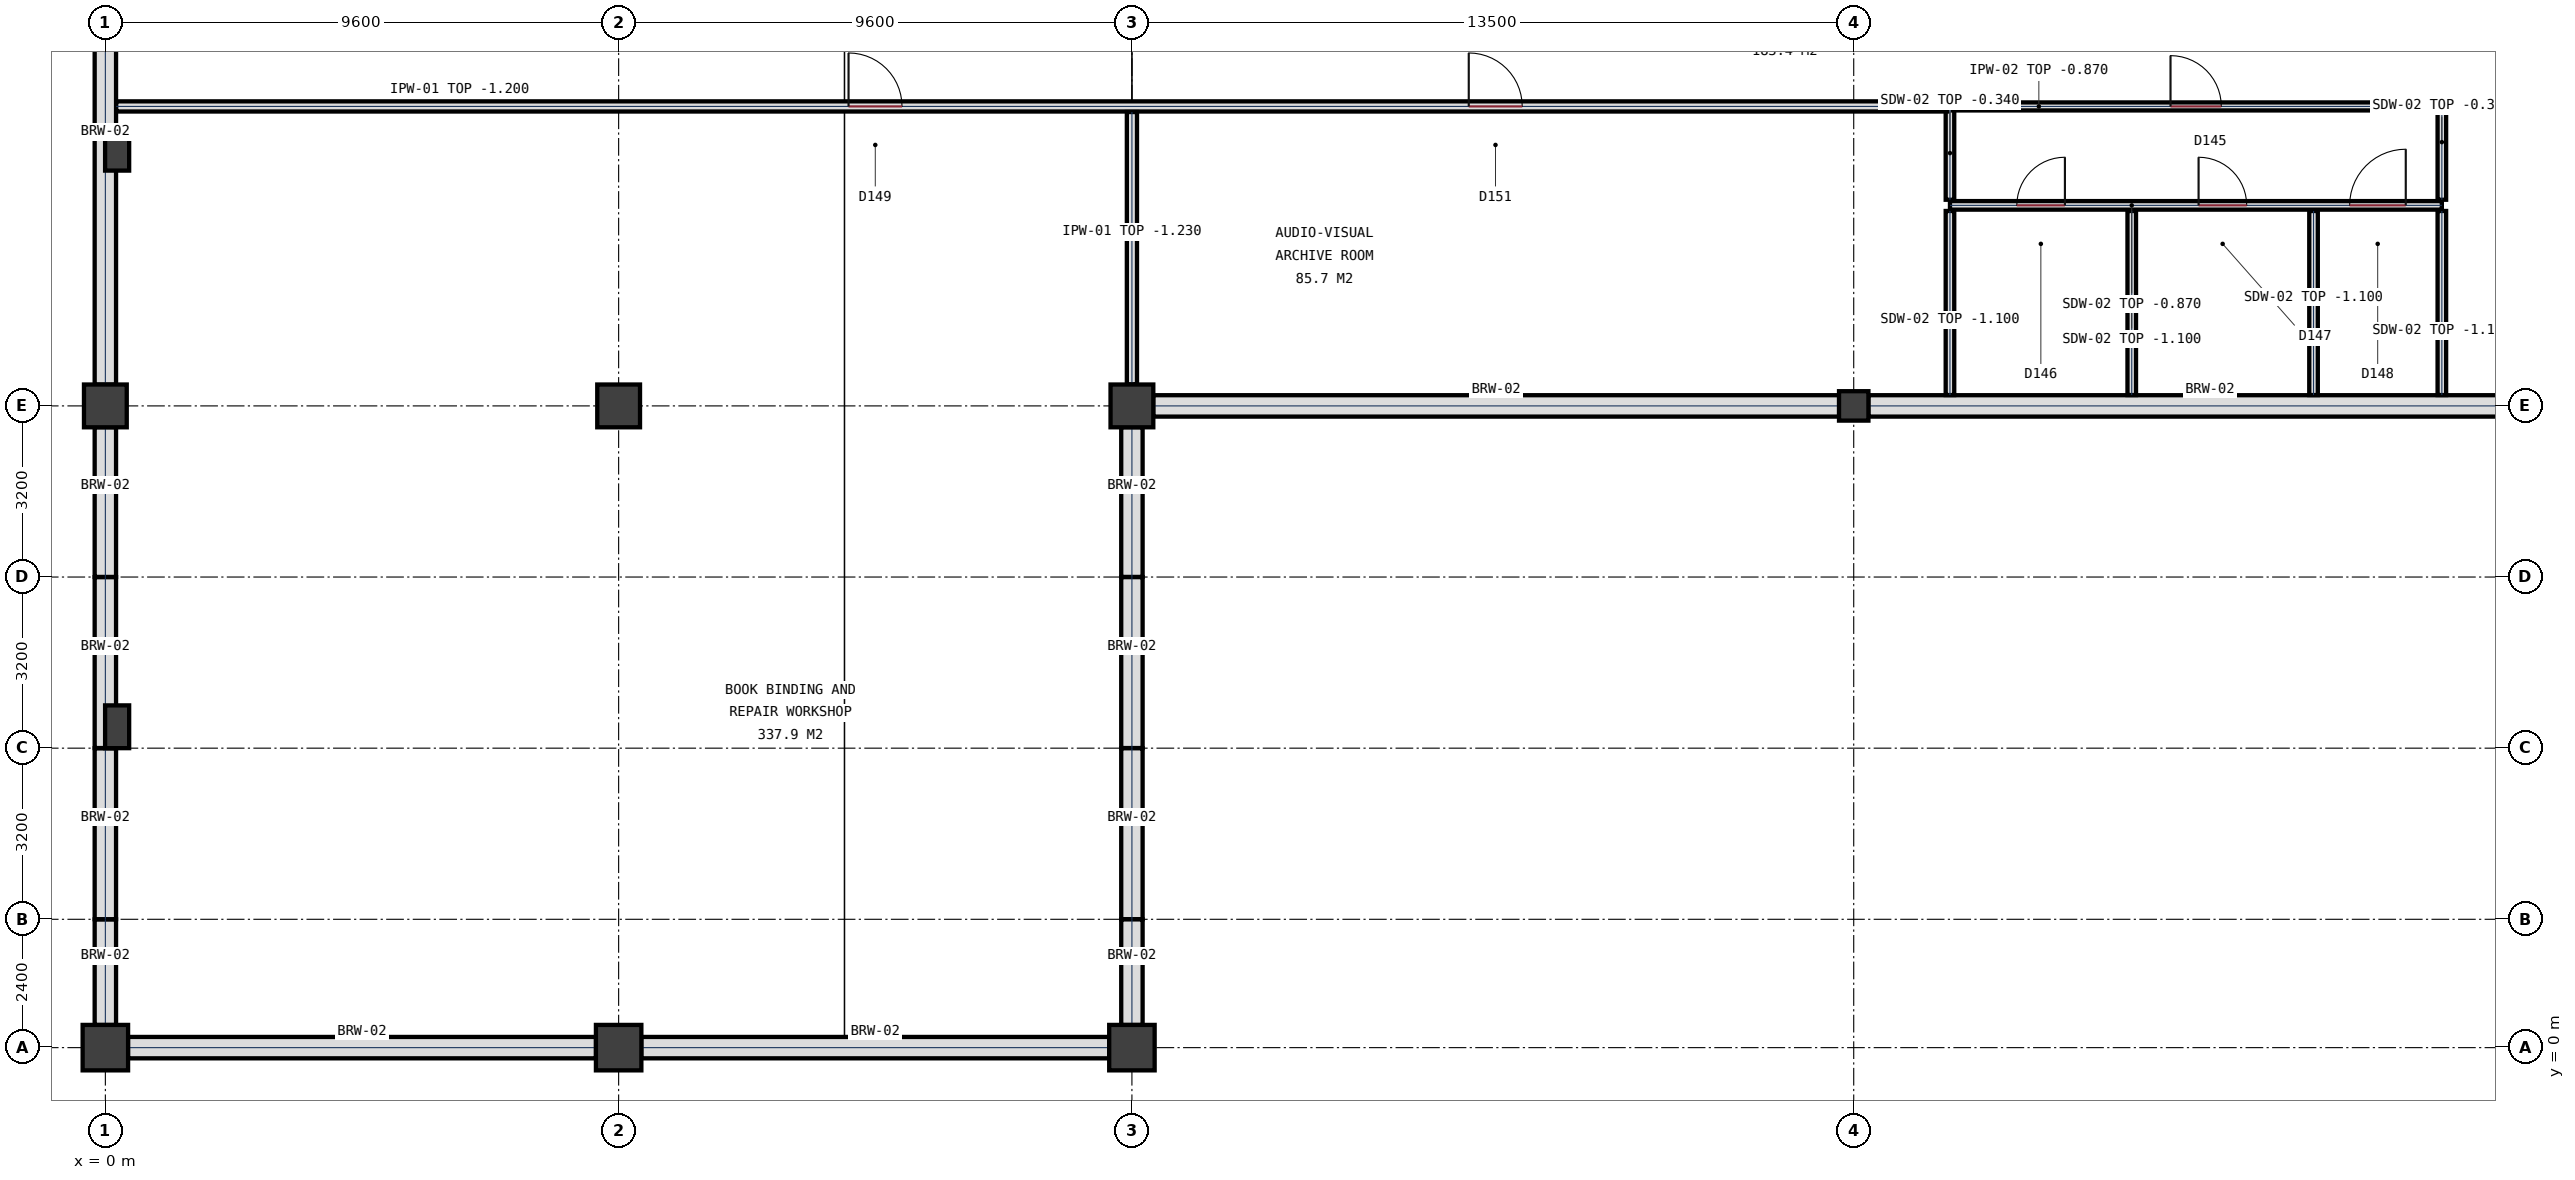
"""IFC4 building model, lengths in metres.
Left out: names, types, materials, properties, quantities, classifications, styles, units other than length and angle.
Written with IfcOpenShell. Run it as: python <this file> out.ifc"""

import sys

from ifc_helpers import new_model, si_unit, direction, frame, frame_2d, origin, origin_with_axes, origin_2d, place, context, subcontext, project, spatial, rectangle, extrude, element, fill, save


model = new_model("IFC4")
c1 = context("Model", 3, precision=1e-05, world=origin(), true_north=direction((0.0, 1.0)))
c2 = subcontext(c1, "Body", "Model", "MODEL_VIEW")
j1 = project(units=[si_unit("LENGTHUNIT", "METRE"), si_unit("PLANEANGLEUNIT", "RADIAN")], contexts=[c1])
p1 = place(None, origin())
s1 = spatial("IfcSite", under=j1, at=p1, CompositionType="ELEMENT")
p2 = place(p1, origin())
s2 = spatial("IfcBuilding", under=s1, at=p2, CompositionType="ELEMENT")
p3 = place(p2, frame((0.0, 0.0, -4.2)))
s3 = spatial("IfcBuildingStorey", under=s2, at=p3, CompositionType="ELEMENT", Elevation=-4.2)
p4 = place(p3, origin_with_axes())
e1 = element("IfcColumn", 1, at=p4, inside=s3, PredefinedType="COLUMN", context=c2, shape_type="SweptSolid", body=[
    extrude(rectangle(XDim=0.85, YDim=0.85, at=origin_2d()), origin(), (0.0, 0.0, 1.0), 4.2),
])
p5 = place(p3, frame((0.0, 12.0, 0.0), z_axis=(0.0, 0.0, 1.0), x_axis=(1.0, 0.0, 0.0)))
e2 = element("IfcColumn", 2, at=p5, inside=s3, PredefinedType="COLUMN", context=c2, shape_type="SweptSolid", body=[
    extrude(rectangle(XDim=0.8, YDim=0.8, at=origin_2d()), origin(), (0.0, 0.0, 1.0), 4.2),
])
p6 = place(p3, frame((9.6, 0.0, 0.0), z_axis=(0.0, 0.0, 1.0), x_axis=(1.0, 0.0, 0.0)))
e3 = element("IfcColumn", 3, at=p6, inside=s3, PredefinedType="COLUMN", context=c2, shape_type="SweptSolid", body=[
    extrude(rectangle(XDim=0.85, YDim=0.85, at=origin_2d()), origin(), (0.0, 0.0, 1.0), 4.2),
])
p7 = place(p3, frame((9.6, 12.0, 0.0), z_axis=(0.0, 0.0, 1.0), x_axis=(1.0, 0.0, 0.0)))
e4 = element("IfcColumn", 4, at=p7, inside=s3, PredefinedType="COLUMN", context=c2, shape_type="SweptSolid", body=[
    extrude(rectangle(XDim=0.8, YDim=0.8, at=origin_2d()), origin(), (0.0, 0.0, 1.0), 4.2),
])
p8 = place(p3, frame((19.2, 0.0, 0.0), z_axis=(0.0, 0.0, 1.0), x_axis=(1.0, 0.0, 0.0)))
e5 = element("IfcColumn", 5, at=p8, inside=s3, PredefinedType="COLUMN", context=c2, shape_type="SweptSolid", body=[
    extrude(rectangle(XDim=0.85, YDim=0.85, at=origin_2d()), origin(), (0.0, 0.0, 1.0), 4.2),
])
p9 = place(p3, frame((19.2, 12.0, 0.0), z_axis=(0.0, 0.0, 1.0), x_axis=(1.0, 0.0, 0.0)))
e6 = element("IfcColumn", 6, at=p9, inside=s3, PredefinedType="COLUMN", context=c2, shape_type="SweptSolid", body=[
    extrude(rectangle(XDim=0.8, YDim=0.8, at=origin_2d()), origin(), (0.0, 0.0, 1.0), 4.2),
])
p10 = place(p3, frame((32.7, 12.0, 0.0), z_axis=(0.0, 0.0, 1.0), x_axis=(1.0, 0.0, 0.0)))
e7 = element("IfcColumn", 7, at=p10, inside=s3, PredefinedType="COLUMN", context=c2, shape_type="SweptSolid", body=[
    extrude(rectangle(XDim=0.55, YDim=0.55, at=origin_2d()), origin(), (0.0, 0.0, 1.0), 4.2),
])
for number, where, z_axis, x_axis in (
    (8, (0.22, 6.0, 0.0), (0.0, 0.0, 1.0), (1.0, 0.0, 0.0)),
    (9, (0.22, 16.8, 0.0), (0.0, 0.0, 1.0), (1.0, 0.0, 0.0)),
):
    element("IfcColumn", number, at=place(p3, frame(where, z_axis=z_axis, x_axis=x_axis)), inside=s3, PredefinedType="PILASTER", context=c2, shape_type="SweptSolid", body=[
        extrude(rectangle(XDim=0.45, YDim=0.8, at=origin_2d()), origin(), (0.0, 0.0, 1.0), 4.2),
    ])
p11 = place(p3, frame((18.777, 0.0, 0.0), z_axis=(0.0, 0.0, 1.0), x_axis=(-1.0, 0.0, 0.0)))
e10 = element("IfcWall", 10, at=p11, inside=s3, PredefinedType="USERDEFINED", context=c2, shape_type="SweptSolid", body=[
    extrude(rectangle(XDim=8.754, YDim=0.4, at=frame_2d((4.377, 0.0))), origin(), (0.0, 0.0, 1.0), 3.88),
])
p12 = place(p3, frame((9.177, 0.0, 0.0), z_axis=(0.0, 0.0, 1.0), x_axis=(-1.0, 0.0, 0.0)))
e11 = element("IfcWall", 11, at=p12, inside=s3, PredefinedType="USERDEFINED", context=c2, shape_type="SweptSolid", body=[
    extrude(rectangle(XDim=8.754, YDim=0.4, at=frame_2d((4.377, 0.0))), origin(), (0.0, 0.0, 1.0), 3.88),
])
p13 = place(p3, frame((0.0, 0.423, 0.0), z_axis=(0.0, 0.0, 1.0), x_axis=(0.0, 1.0, 0.0)))
e12 = element("IfcWall", 12, at=p13, inside=s3, PredefinedType="USERDEFINED", context=c2, shape_type="SweptSolid", body=[
    extrude(rectangle(XDim=1.975, YDim=0.4, at=frame_2d((0.987, 0.0))), origin(), (0.0, 0.0, 1.0), 3.88),
])
p14 = place(p3, frame((0.0, 2.402, 0.0), z_axis=(0.0, 0.0, 1.0), x_axis=(0.0, 1.0, 0.0)))
e13 = element("IfcWall", 13, at=p14, inside=s3, PredefinedType="USERDEFINED", context=c2, shape_type="SweptSolid", body=[
    extrude(rectangle(XDim=3.196, YDim=0.4, at=frame_2d((1.598, 0.0))), origin(), (0.0, 0.0, 1.0), 3.88),
])
p15 = place(p3, frame((0.0, 5.602, 0.0), z_axis=(0.0, 0.0, 1.0), x_axis=(0.0, 1.0, 0.0)))
e14 = element("IfcWall", 14, at=p15, inside=s3, PredefinedType="USERDEFINED", context=c2, shape_type="SweptSolid", body=[
    extrude(rectangle(XDim=3.196, YDim=0.4, at=frame_2d((1.598, 0.0))), origin(), (0.0, 0.0, 1.0), 3.88),
])
p16 = place(p3, frame((0.0, 8.802, 0.0), z_axis=(0.0, 0.0, 1.0), x_axis=(0.0, 1.0, 0.0)))
e15 = element("IfcWall", 15, at=p16, inside=s3, PredefinedType="USERDEFINED", context=c2, shape_type="SweptSolid", body=[
    extrude(rectangle(XDim=2.8, YDim=0.4, at=frame_2d((1.4, 0.0))), origin(), (0.0, 0.0, 1.0), 3.88),
])
p17 = place(p3, frame((0.0, 12.398, 0.0), z_axis=(0.0, 0.0, 1.0), x_axis=(0.0, 1.0, 0.0)))
e16 = element("IfcWall", 16, at=p17, inside=s3, PredefinedType="USERDEFINED", context=c2, shape_type="SweptSolid", body=[
    extrude(rectangle(XDim=8.829, YDim=0.4, at=frame_2d((4.415, 0.0))), origin(), (0.0, 0.0, 1.0), 3.88),
])
p18 = place(p3, frame((45.752, 12.0, 0.0), z_axis=(0.0, 0.0, 1.0), x_axis=(-1.0, 0.0, 0.0)))
e17 = element("IfcWall", 17, at=p18, inside=s3, PredefinedType="USERDEFINED", context=c2, shape_type="SweptSolid", body=[
    extrude(rectangle(XDim=12.779, YDim=0.4, at=frame_2d((6.39, 0.0))), origin(), (0.0, 0.0, 1.0), 3.86),
])
p19 = place(p3, frame((32.427, 12.0, 0.0), z_axis=(0.0, 0.0, 1.0), x_axis=(-1.0, 0.0, 0.0)))
e18 = element("IfcWall", 18, at=p19, inside=s3, PredefinedType="USERDEFINED", context=c2, shape_type="SweptSolid", body=[
    extrude(rectangle(XDim=12.829, YDim=0.4, at=frame_2d((6.415, 0.0))), origin(), (0.0, 0.0, 1.0), 3.86),
])
p20 = place(p3, frame((19.2, 11.602, 0.0), z_axis=(0.0, 0.0, 1.0), x_axis=(0.0, -1.0, 0.0)))
e19 = element("IfcWall", 19, at=p20, inside=s3, PredefinedType="USERDEFINED", context=c2, shape_type="SweptSolid", body=[
    extrude(rectangle(XDim=2.8, YDim=0.4, at=frame_2d((1.4, 0.0))), origin(), (0.0, 0.0, 1.0), 3.88),
])
p21 = place(p3, frame((19.2, 8.798, 0.0), z_axis=(0.0, 0.0, 1.0), x_axis=(0.0, -1.0, 0.0)))
e20 = element("IfcWall", 20, at=p21, inside=s3, PredefinedType="USERDEFINED", context=c2, shape_type="SweptSolid", body=[
    extrude(rectangle(XDim=3.196, YDim=0.4, at=frame_2d((1.598, 0.0))), origin(), (0.0, 0.0, 1.0), 3.88),
])
p22 = place(p3, frame((19.2, 5.598, 0.0), z_axis=(0.0, 0.0, 1.0), x_axis=(0.0, -1.0, 0.0)))
e21 = element("IfcWall", 21, at=p22, inside=s3, PredefinedType="USERDEFINED", context=c2, shape_type="SweptSolid", body=[
    extrude(rectangle(XDim=3.196, YDim=0.4, at=frame_2d((1.598, 0.0))), origin(), (0.0, 0.0, 1.0), 3.88),
])
p23 = place(p3, frame((19.2, 2.398, 0.0), z_axis=(0.0, 0.0, 1.0), x_axis=(0.0, -1.0, 0.0)))
e22 = element("IfcWall", 22, at=p23, inside=s3, PredefinedType="USERDEFINED", context=c2, shape_type="SweptSolid", body=[
    extrude(rectangle(XDim=1.975, YDim=0.4, at=frame_2d((0.987, 0.0))), origin(), (0.0, 0.0, 1.0), 3.88),
])
p24 = place(p3, frame((34.5, 15.75, 0.0), z_axis=(0.0, 0.0, 1.0), x_axis=(1.0, 0.0, 0.0)))
e23 = element("IfcWall", 23, at=p24, inside=s3, PredefinedType="PLUMBINGWALL", context=c2, shape_type="SweptSolid", body=[
    extrude(rectangle(XDim=9.2, YDim=0.16, at=frame_2d((4.6, 0.0))), origin(), (0.0, 0.0, 1.0), 3.33),
])
p25 = place(p24, frame((1.25, 0.0, 0.0)))
e24 = element("IfcOpeningElement", 24, at=p25, cuts=e23, PredefinedType="OPENING", context=c2, shape_type="SweptSolid", body=[
    extrude(rectangle(XDim=0.9, YDim=2.1, at=frame_2d((0.45, 1.05))), frame((0.0, 0.09, 0.0), z_axis=(0.0, -1.0, 0.0), x_axis=(1.0, 0.0, 0.0)), (0.0, 0.0, 1.0), 0.18),
])
p26 = place(p24, frame((4.65, 0.0, 0.0)))
e25 = element("IfcOpeningElement", 25, at=p26, cuts=e23, PredefinedType="OPENING", context=c2, shape_type="SweptSolid", body=[
    extrude(rectangle(XDim=0.9, YDim=2.1, at=frame_2d((0.45, 1.05))), frame((0.0, 0.09, 0.0), z_axis=(0.0, -1.0, 0.0), x_axis=(1.0, 0.0, 0.0)), (0.0, 0.0, 1.0), 0.18),
])
p27 = place(p24, frame((7.475, 0.0, 0.0)))
e26 = element("IfcOpeningElement", 26, at=p27, cuts=e23, PredefinedType="OPENING", context=c2, shape_type="SweptSolid", body=[
    extrude(rectangle(XDim=1.05, YDim=2.15, at=frame_2d((0.525, 1.075))), frame((0.0, 0.09, 0.0), z_axis=(0.0, -1.0, 0.0), x_axis=(1.0, 0.0, 0.0)), (0.0, 0.0, 1.0), 0.18),
])
p28 = place(p3, frame((34.5, 12.203, 0.0), z_axis=(0.0, 0.0, 1.0), x_axis=(0.0, 1.0, 0.0)))
e27 = element("IfcWall", 27, at=p28, inside=s3, PredefinedType="PLUMBINGWALL", context=c2, shape_type="SweptSolid", body=[
    extrude(rectangle(XDim=3.442, YDim=0.16, at=frame_2d((1.721, 0.0))), origin(), (0.0, 0.0, 1.0), 3.1),
])
p29 = place(p3, frame((34.5, 15.855, 0.0), z_axis=(0.0, 0.0, 1.0), x_axis=(0.0, 1.0, 0.0)))
e28 = element("IfcWall", 28, at=p29, inside=s3, PredefinedType="PLUMBINGWALL", context=c2, shape_type="SweptSolid", body=[
    extrude(rectangle(XDim=1.745, YDim=0.16, at=frame_2d((0.873, 0.0))), origin(), (0.0, 0.0, 1.0), 3.86),
])
for number, where, z_axis, x_axis in (
    (29, (37.9, 12.203, 0.0), (0.0, 0.0, 1.0), (0.0, 1.0, 0.0)),
    (30, (41.3, 12.203, 0.0), (0.0, 0.0, 1.0), (0.0, 1.0, 0.0)),
    (31, (43.7, 12.203, 0.0), (0.0, 0.0, 1.0), (0.0, 1.0, 0.0)),
):
    element("IfcWall", number, at=place(p3, frame(where, z_axis=z_axis, x_axis=x_axis)), inside=s3, PredefinedType="PLUMBINGWALL", context=c2, shape_type="SweptSolid", body=[
        extrude(rectangle(XDim=3.442, YDim=0.16, at=frame_2d((1.721, 0.0))), origin(), (0.0, 0.0, 1.0), 3.1),
    ])
p30 = place(p3, frame((43.7, 15.855, 0.0), z_axis=(0.0, 0.0, 1.0), x_axis=(0.0, 1.0, 0.0)))
e32 = element("IfcWall", 32, at=p30, inside=s3, PredefinedType="PLUMBINGWALL", context=c2, shape_type="SweptSolid", body=[
    extrude(rectangle(XDim=1.745, YDim=0.16, at=frame_2d((0.873, 0.0))), origin(), (0.0, 0.0, 1.0), 3.86),
])
p31 = place(p3, frame((0.203, 17.6, 0.0), z_axis=(0.0, 0.0, 1.0), x_axis=(1.0, 0.0, 0.0)))
e33 = element("IfcWall", 33, at=p31, inside=s3, PredefinedType="PARTITIONING", context=c2, shape_type="SweptSolid", body=[
    extrude(rectangle(XDim=34.247, YDim=0.19, at=frame_2d((17.124, 0.0))), origin(), (0.0, 0.0, 1.0), 3.0),
])
p32 = place(p31, frame((13.697, 0.0, 0.0)))
e34 = element("IfcOpeningElement", 34, at=p32, cuts=e33, PredefinedType="OPENING", context=c2, shape_type="SweptSolid", body=[
    extrude(rectangle(XDim=1.0, YDim=2.2, at=frame_2d((0.5, 1.1))), frame((0.0, 0.105, 0.0), z_axis=(0.0, -1.0, 0.0), x_axis=(1.0, 0.0, 0.0)), (0.0, 0.0, 1.0), 0.21),
])
p33 = place(p31, frame((25.297, 0.0, 0.0)))
e35 = element("IfcOpeningElement", 35, at=p33, cuts=e33, PredefinedType="OPENING", context=c2, shape_type="SweptSolid", body=[
    extrude(rectangle(XDim=1.0, YDim=2.2, at=frame_2d((0.5, 1.1))), frame((0.0, 0.105, 0.0), z_axis=(0.0, -1.0, 0.0), x_axis=(1.0, 0.0, 0.0)), (0.0, 0.0, 1.0), 0.21),
])
p34 = place(p3, frame((34.55, 17.6, 0.0), z_axis=(0.0, 0.0, 1.0), x_axis=(1.0, 0.0, 0.0)))
e36 = element("IfcWall", 36, at=p34, inside=s3, PredefinedType="PARTITIONING", context=c2, shape_type="SweptSolid", body=[
    extrude(rectangle(XDim=9.1, YDim=0.15, at=frame_2d((4.55, 0.0))), origin(), (0.0, 0.0, 1.0), 3.33),
])
p35 = place(p34, frame((4.075, 0.0, 0.0)))
e37 = element("IfcOpeningElement", 37, at=p35, cuts=e36, PredefinedType="OPENING", context=c2, shape_type="SweptSolid", body=[
    extrude(rectangle(XDim=0.95, YDim=2.15, at=frame_2d((0.475, 1.075))), frame((0.0, 0.085, 0.0), z_axis=(0.0, -1.0, 0.0), x_axis=(1.0, 0.0, 0.0)), (0.0, 0.0, 1.0), 0.17),
])
p36 = place(p3, frame((43.75, 17.6, 0.0), z_axis=(0.0, 0.0, 1.0), x_axis=(1.0, 0.0, 0.0)))
e38 = element("IfcWall", 38, at=p36, inside=s3, PredefinedType="PARTITIONING", context=c2, shape_type="SweptSolid", body=[
    extrude(rectangle(XDim=16.7, YDim=0.13, at=frame_2d((8.35, 0.0))), origin(), (0.0, 0.0, 1.0), 2.95),
])
p37 = place(p36, frame((8.675, 0.0, 0.0)))
e39 = element("IfcOpeningElement", 39, at=p37, cuts=e38, PredefinedType="OPENING", context=c2, shape_type="SweptSolid", body=[
    extrude(rectangle(XDim=0.95, YDim=2.15, at=frame_2d((0.475, 1.075))), frame((0.0, 0.075, 0.0), z_axis=(0.0, -1.0, 0.0), x_axis=(1.0, 0.0, 0.0)), (0.0, 0.0, 1.0), 0.15),
])
p38 = place(p3, frame((19.2, 12.403, 0.0), z_axis=(0.0, 0.0, 1.0), x_axis=(0.0, 1.0, 0.0)))
e40 = element("IfcWall", 40, at=p38, inside=s3, PredefinedType="PARTITIONING", context=c2, shape_type="SweptSolid", body=[
    extrude(rectangle(XDim=5.092, YDim=0.19, at=frame_2d((2.546, 0.0))), origin(), (0.0, 0.0, 1.0), 2.97),
])
p39 = place(p35, origin())
e41 = element("IfcDoor", 41, at=p39, inside=s3, OperationType="SINGLE_SWING_LEFT", PredefinedType="DOOR", context=c2, shape_type="SweptSolid", body=[
    extrude(rectangle(XDim=0.95, YDim=2.15, at=frame_2d((0.475, 1.075))), frame((0.0, 0.032, 0.0), z_axis=(0.0, -1.0, 0.0), x_axis=(1.0, 0.0, 0.0)), (0.0, 0.0, 1.0), 0.065),
])
fill(e37, e41)
p40 = place(p25, origin())
e42 = element("IfcDoor", 42, at=p40, inside=s3, OperationType="SINGLE_SWING_RIGHT", PredefinedType="DOOR", context=c2, shape_type="SweptSolid", body=[
    extrude(rectangle(XDim=0.9, YDim=2.1, at=frame_2d((0.45, 1.05))), frame((0.0, 0.032, 0.0), z_axis=(0.0, -1.0, 0.0), x_axis=(1.0, 0.0, 0.0)), (0.0, 0.0, 1.0), 0.065),
])
fill(e24, e42)
p41 = place(p26, origin())
e43 = element("IfcDoor", 43, at=p41, inside=s3, OperationType="SINGLE_SWING_LEFT", PredefinedType="DOOR", context=c2, shape_type="SweptSolid", body=[
    extrude(rectangle(XDim=0.9, YDim=2.1, at=frame_2d((0.45, 1.05))), frame((0.0, 0.032, 0.0), z_axis=(0.0, -1.0, 0.0), x_axis=(1.0, 0.0, 0.0)), (0.0, 0.0, 1.0), 0.065),
])
fill(e25, e43)
p42 = place(p27, origin())
e44 = element("IfcDoor", 44, at=p42, inside=s3, OperationType="SINGLE_SWING_RIGHT", PredefinedType="DOOR", context=c2, shape_type="SweptSolid", body=[
    extrude(rectangle(XDim=1.05, YDim=2.15, at=frame_2d((0.525, 1.075))), frame((0.0, 0.032, 0.0), z_axis=(0.0, -1.0, 0.0), x_axis=(1.0, 0.0, 0.0)), (0.0, 0.0, 1.0), 0.065),
])
fill(e26, e44)
p43 = place(p32, origin())
e45 = element("IfcDoor", 45, at=p43, inside=s3, OperationType="SINGLE_SWING_LEFT", PredefinedType="DOOR", context=c2, shape_type="SweptSolid", body=[
    extrude(rectangle(XDim=1.0, YDim=2.2, at=frame_2d((0.5, 1.1))), frame((0.0, 0.032, 0.0), z_axis=(0.0, -1.0, 0.0), x_axis=(1.0, 0.0, 0.0)), (0.0, 0.0, 1.0), 0.065),
])
fill(e34, e45)
p44 = place(p33, origin())
e46 = element("IfcDoor", 46, at=p44, inside=s3, OperationType="SINGLE_SWING_LEFT", PredefinedType="DOOR", context=c2, shape_type="SweptSolid", body=[
    extrude(rectangle(XDim=1.0, YDim=2.2, at=frame_2d((0.5, 1.1))), frame((0.0, 0.032, 0.0), z_axis=(0.0, -1.0, 0.0), x_axis=(1.0, 0.0, 0.0)), (0.0, 0.0, 1.0), 0.065),
])
fill(e35, e46)
save(model, sys.argv[1])
